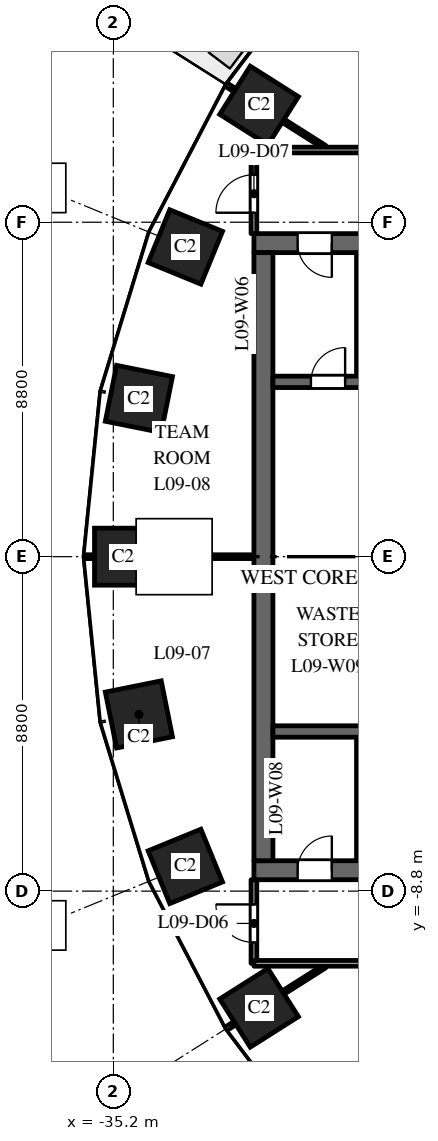
"""IFC4 building model, lengths in metres.
Left out: names, types, materials, properties, quantities, classifications, styles, units other than length and angle.
Written with IfcOpenShell. Run it as: python <this file> out.ifc"""

import sys

from ifc_helpers import new_model, si_unit, direction, frame, frame_2d, origin, origin_2d, place, context, subcontext, project, spatial, rectangle, extrude, element, fill, save


model = new_model("IFC4")
c1 = context("Model", 3, precision=1e-05, world=origin(), true_north=direction((0.0, 1.0)))
c2 = subcontext(c1, "Body", "Model", "MODEL_VIEW")
j1 = project(units=[si_unit("LENGTHUNIT", "METRE"), si_unit("PLANEANGLEUNIT", "RADIAN")], contexts=[c1])
p1 = place(None, origin())
s1 = spatial("IfcSite", under=j1, at=p1, CompositionType="ELEMENT")
p2 = place(p1, origin())
s2 = spatial("IfcBuilding", under=s1, at=p2, CompositionType="ELEMENT")
p3 = place(p2, frame((0.0, 0.0, 46.5)))
s3 = spatial("IfcBuildingStorey", under=s2, at=p3, CompositionType="ELEMENT", Elevation=46.5)
for number, where, z_axis, x_axis in (
    (1, (-31.365, 11.871, 0.0), (0.0, 0.0, 1.0), (-0.535, -0.845, 0.0)),
    (2, (-33.305, 8.149, 0.0), (0.0, 0.0, 1.0), (-0.379, -0.925, 0.0)),
    (3, (-34.527, 4.151, 0.0), (0.0, 0.0, 1.0), (-0.197, -0.98, 0.0)),
    (4, (-34.945, 0.0, 0.0), (0.0, 0.0, 1.0), (0.0, -1.0, 0.0)),
    (5, (-34.527, -4.151, 0.0), (0.0, 0.0, 1.0), (0.197, -0.98, 0.0)),
    (6, (-33.305, -8.149, 0.0), (0.0, 0.0, 1.0), (0.379, -0.925, 0.0)),
    (7, (-31.365, -11.871, 0.0), (0.0, 0.0, 1.0), (0.535, -0.845, 0.0)),
):
    element("IfcColumn", number, at=place(p3, frame(where, z_axis=z_axis, x_axis=x_axis)), inside=s3, PredefinedType="COLUMN", context=c2, shape_type="SweptSolid", body=[
        extrude(rectangle(XDim=1.5, YDim=1.5, at=origin_2d()), origin(), (0.0, 0.0, 1.0), 4.0),
    ])
p4 = place(p3, frame((-16.5, 8.25, 0.0), z_axis=(0.0, 0.0, 1.0), x_axis=(-1.0, 0.0, 0.0)))
e8 = element("IfcWall", 8, at=p4, inside=s3, PredefinedType="SHEAR", context=c2, shape_type="SweptSolid", body=[
    extrude(rectangle(XDim=15.0, YDim=0.5, at=frame_2d((7.5, 0.0))), origin(), (0.0, 0.0, 1.0), 3.7),
])
p5 = place(p4, frame((6.9, 0.0, 0.0)))
e9 = element("IfcOpeningElement", 9, at=p5, cuts=e8, PredefinedType="OPENING", context=c2, shape_type="SweptSolid", body=[
    extrude(rectangle(XDim=1.2, YDim=2.1, at=frame_2d((0.6, 1.05))), frame((0.0, 0.26, 0.0), z_axis=(0.0, -1.0, 0.0), x_axis=(1.0, 0.0, 0.0)), (0.0, 0.0, 1.0), 0.52),
])
p6 = place(p4, frame((12.95, 0.0, 0.0)))
e10 = element("IfcOpeningElement", 10, at=p6, cuts=e8, PredefinedType="OPENING", context=c2, shape_type="SweptSolid", body=[
    extrude(rectangle(XDim=0.9, YDim=2.1, at=frame_2d((0.45, 1.05))), frame((0.0, 0.26, 0.0), z_axis=(0.0, -1.0, 0.0), x_axis=(1.0, 0.0, 0.0)), (0.0, 0.0, 1.0), 0.52),
])
p7 = place(p3, frame((-16.5, -8.25, 0.0), z_axis=(0.0, 0.0, 1.0), x_axis=(-1.0, 0.0, 0.0)))
e11 = element("IfcWall", 11, at=p7, inside=s3, PredefinedType="SHEAR", context=c2, shape_type="SweptSolid", body=[
    extrude(rectangle(XDim=15.0, YDim=0.5, at=frame_2d((7.5, 0.0))), origin(), (0.0, 0.0, 1.0), 3.7),
])
p8 = place(p7, frame((6.9, 0.0, 0.0)))
e12 = element("IfcOpeningElement", 12, at=p8, cuts=e11, PredefinedType="OPENING", context=c2, shape_type="SweptSolid", body=[
    extrude(rectangle(XDim=1.2, YDim=2.1, at=frame_2d((0.6, 1.05))), frame((0.0, 0.26, 0.0), z_axis=(0.0, -1.0, 0.0), x_axis=(1.0, 0.0, 0.0)), (0.0, 0.0, 1.0), 0.52),
])
p9 = place(p7, frame((12.95, 0.0, 0.0)))
e13 = element("IfcOpeningElement", 13, at=p9, cuts=e11, PredefinedType="OPENING", context=c2, shape_type="SweptSolid", body=[
    extrude(rectangle(XDim=0.9, YDim=2.1, at=frame_2d((0.45, 1.05))), frame((0.0, 0.26, 0.0), z_axis=(0.0, -1.0, 0.0), x_axis=(1.0, 0.0, 0.0)), (0.0, 0.0, 1.0), 0.52),
])
p10 = place(p3, frame((-31.25, -8.0, 0.0), z_axis=(0.0, 0.0, 1.0), x_axis=(0.0, 1.0, 0.0)))
e14 = element("IfcWall", 14, at=p10, inside=s3, PredefinedType="SHEAR", context=c2, shape_type="SweptSolid", body=[
    extrude(rectangle(XDim=16.0, YDim=0.5, at=frame_2d((8.0, 0.0))), origin(), (0.0, 0.0, 1.0), 3.7),
])
p11 = place(p3, frame((-24.9, 4.6, 0.0), z_axis=(0.0, 0.0, 1.0), x_axis=(-1.0, 0.0, 0.0)))
e15 = element("IfcWall", 15, at=p11, inside=s3, PredefinedType="SHEAR", context=c2, shape_type="SweptSolid", body=[
    extrude(rectangle(XDim=6.1, YDim=0.3, at=frame_2d((3.05, 0.0))), origin(), (0.0, 0.0, 1.0), 3.7),
])
p12 = place(p11, frame((4.2, 0.0, 0.0)))
e16 = element("IfcOpeningElement", 16, at=p12, cuts=e15, PredefinedType="OPENING", context=c2, shape_type="SweptSolid", body=[
    extrude(rectangle(XDim=0.9, YDim=2.1, at=frame_2d((0.45, 1.05))), frame((0.0, 0.16, 0.0), z_axis=(0.0, -1.0, 0.0), x_axis=(1.0, 0.0, 0.0)), (0.0, 0.0, 1.0), 0.32),
])
for number, where, z_axis, x_axis in (
    (17, (-28.7, 4.75, 0.0), (0.0, 0.0, 1.0), (0.0, 1.0, 0.0)),
    (18, (-28.7, -8.0, 0.0), (0.0, 0.0, 1.0), (0.0, 1.0, 0.0)),
):
    element("IfcWall", number, at=place(p3, frame(where, z_axis=z_axis, x_axis=x_axis)), inside=s3, PredefinedType="PARTITIONING", context=c2, shape_type="SweptSolid", body=[
        extrude(rectangle(XDim=3.25, YDim=0.2, at=frame_2d((1.625, 0.0))), origin(), (0.0, 0.0, 1.0), 3.7),
    ])
p13 = place(p3, frame((-24.9, -4.6, 0.0), z_axis=(0.0, 0.0, 1.0), x_axis=(-1.0, 0.0, 0.0)))
e19 = element("IfcWall", 19, at=p13, inside=s3, PredefinedType="SHEAR", context=c2, shape_type="SweptSolid", body=[
    extrude(rectangle(XDim=6.1, YDim=0.3, at=frame_2d((3.05, 0.0))), origin(), (0.0, 0.0, 1.0), 3.7),
])
p14 = place(p3, frame((-35.949, 0.0, 0.0), z_axis=(0.0, 0.0, 1.0), x_axis=(1.0, 0.0, 0.0)))
e20 = element("IfcWall", 20, at=p14, inside=s3, PredefinedType="PARTITIONING", context=c2, shape_type="SweptSolid", body=[
    extrude(rectangle(XDim=4.449, YDim=0.1, at=frame_2d((2.225, 0.0))), origin(), (0.0, 0.0, 1.0), 2.85),
])
for number, where, z_axis, x_axis in (
    (21, (-32.212, -12.408, 0.0), (0.0, 0.0, 1.0), (0.845, 0.535, 0.0)),
    (22, (-32.212, 12.408, 0.0), (0.0, 0.0, 1.0), (0.845, -0.535, 0.0)),
):
    element("IfcWall", number, at=place(p3, frame(where, z_axis=z_axis, x_axis=x_axis)), inside=s3, PredefinedType="PARTITIONING", context=c2, shape_type="SweptSolid", body=[
        extrude(rectangle(XDim=3.048, YDim=0.1, at=frame_2d((1.524, 0.0))), origin(), (0.0, 0.0, 1.0), 3.7),
    ])
p15 = place(p3, frame((-31.5, -10.7, 0.0), z_axis=(0.0, 0.0, 1.0), x_axis=(0.0, 1.0, 0.0)))
e23 = element("IfcWall", 23, at=p15, inside=s3, PredefinedType="PARTITIONING", context=c2, shape_type="SweptSolid", body=[
    extrude(rectangle(XDim=2.2, YDim=0.15, at=frame_2d((1.1, 0.0))), origin(), (0.0, 0.0, 1.0), 3.7),
])
p16 = place(p15, frame((0.55, 0.0, 0.0)))
e24 = element("IfcOpeningElement", 24, at=p16, cuts=e23, PredefinedType="OPENING", context=c2, shape_type="SweptSolid", body=[
    extrude(rectangle(XDim=1.0, YDim=2.1, at=frame_2d((0.5, 1.05))), frame((0.0, 0.085, 0.0), z_axis=(0.0, -1.0, 0.0), x_axis=(1.0, 0.0, 0.0)), (0.0, 0.0, 1.0), 0.17),
])
p17 = place(p3, frame((-31.5, -10.7, 0.0), z_axis=(0.0, 0.0, 1.0), x_axis=(1.0, 0.0, 0.0)))
e25 = element("IfcWall", 25, at=p17, inside=s3, PredefinedType="PARTITIONING", context=c2, shape_type="SweptSolid", body=[
    extrude(rectangle(XDim=15.0, YDim=0.15, at=frame_2d((7.5, 0.0))), origin(), (0.0, 0.0, 1.0), 3.1),
])
p18 = place(p17, frame((5.629, 0.0, 0.0)))
e26 = element("IfcOpeningElement", 26, at=p18, cuts=e25, PredefinedType="OPENING", context=c2, shape_type="SweptSolid", body=[
    extrude(rectangle(XDim=1.0, YDim=2.1, at=frame_2d((0.5, 1.05))), frame((0.0, 0.085, 0.0), z_axis=(0.0, -1.0, 0.0), x_axis=(1.0, 0.0, 0.0)), (0.0, 0.0, 1.0), 0.17),
])
p19 = place(p3, frame((-31.5, 8.5, 0.0), z_axis=(0.0, 0.0, 1.0), x_axis=(0.0, 1.0, 0.0)))
e27 = element("IfcWall", 27, at=p19, inside=s3, PredefinedType="PARTITIONING", context=c2, shape_type="SweptSolid", body=[
    extrude(rectangle(XDim=2.2, YDim=0.15, at=frame_2d((1.1, 0.0))), origin(), (0.0, 0.0, 1.0), 3.7),
])
p20 = place(p19, frame((0.55, 0.0, 0.0)))
e28 = element("IfcOpeningElement", 28, at=p20, cuts=e27, PredefinedType="OPENING", context=c2, shape_type="SweptSolid", body=[
    extrude(rectangle(XDim=1.0, YDim=2.1, at=frame_2d((0.5, 1.05))), frame((0.0, 0.085, 0.0), z_axis=(0.0, -1.0, 0.0), x_axis=(1.0, 0.0, 0.0)), (0.0, 0.0, 1.0), 0.17),
])
p21 = place(p3, frame((-31.5, 10.7, 0.0), z_axis=(0.0, 0.0, 1.0), x_axis=(1.0, 0.0, 0.0)))
e29 = element("IfcWall", 29, at=p21, inside=s3, PredefinedType="PARTITIONING", context=c2, shape_type="SweptSolid", body=[
    extrude(rectangle(XDim=15.0, YDim=0.15, at=frame_2d((7.5, 0.0))), origin(), (0.0, 0.0, 1.0), 3.1),
])
p22 = place(p21, frame((5.414, 0.0, 0.0)))
e30 = element("IfcOpeningElement", 30, at=p22, cuts=e29, PredefinedType="OPENING", context=c2, shape_type="SweptSolid", body=[
    extrude(rectangle(XDim=1.0, YDim=2.1, at=frame_2d((0.5, 1.05))), frame((0.0, 0.085, 0.0), z_axis=(0.0, -1.0, 0.0), x_axis=(1.0, 0.0, 0.0)), (0.0, 0.0, 1.0), 0.17),
])
p23 = place(p6, origin())
e31 = element("IfcDoor", 31, at=p23, inside=s3, OperationType="SINGLE_SWING_RIGHT", PredefinedType="DOOR", context=c2, shape_type="SweptSolid", body=[
    extrude(rectangle(XDim=0.9, YDim=2.1, at=frame_2d((0.45, 1.05))), frame((0.0, 0.025, 0.0), z_axis=(0.0, -1.0, 0.0), x_axis=(1.0, 0.0, 0.0)), (0.0, 0.0, 1.0), 0.05),
])
fill(e10, e31)
p24 = place(p9, origin())
e32 = element("IfcDoor", 32, at=p24, inside=s3, OperationType="SINGLE_SWING_LEFT", PredefinedType="DOOR", context=c2, shape_type="SweptSolid", body=[
    extrude(rectangle(XDim=0.9, YDim=2.1, at=frame_2d((0.45, 1.05))), frame((0.0, 0.025, 0.0), z_axis=(0.0, -1.0, 0.0), x_axis=(1.0, 0.0, 0.0)), (0.0, 0.0, 1.0), 0.05),
])
fill(e13, e32)
p25 = place(p12, origin())
e33 = element("IfcDoor", 33, at=p25, inside=s3, OperationType="SINGLE_SWING_LEFT", PredefinedType="DOOR", context=c2, shape_type="SweptSolid", body=[
    extrude(rectangle(XDim=0.9, YDim=2.1, at=frame_2d((0.45, 1.05))), frame((0.0, 0.025, 0.0), z_axis=(0.0, -1.0, 0.0), x_axis=(1.0, 0.0, 0.0)), (0.0, 0.0, 1.0), 0.05),
])
fill(e16, e33)
p26 = place(p16, origin())
e34 = element("IfcDoor", 34, at=p26, inside=s3, OperationType="SINGLE_SWING_RIGHT", PredefinedType="DOOR", context=c2, shape_type="SweptSolid", body=[
    extrude(rectangle(XDim=1.0, YDim=2.1, at=frame_2d((0.5, 1.05))), frame((0.0, 0.025, 0.0), z_axis=(0.0, -1.0, 0.0), x_axis=(1.0, 0.0, 0.0)), (0.0, 0.0, 1.0), 0.05),
])
fill(e24, e34)
p27 = place(p20, origin())
e35 = element("IfcDoor", 35, at=p27, inside=s3, OperationType="SINGLE_SWING_LEFT", PredefinedType="DOOR", context=c2, shape_type="SweptSolid", body=[
    extrude(rectangle(XDim=1.0, YDim=2.1, at=frame_2d((0.5, 1.05))), frame((0.0, 0.025, 0.0), z_axis=(0.0, -1.0, 0.0), x_axis=(1.0, 0.0, 0.0)), (0.0, 0.0, 1.0), 0.05),
])
fill(e28, e35)
save(model, sys.argv[1])
